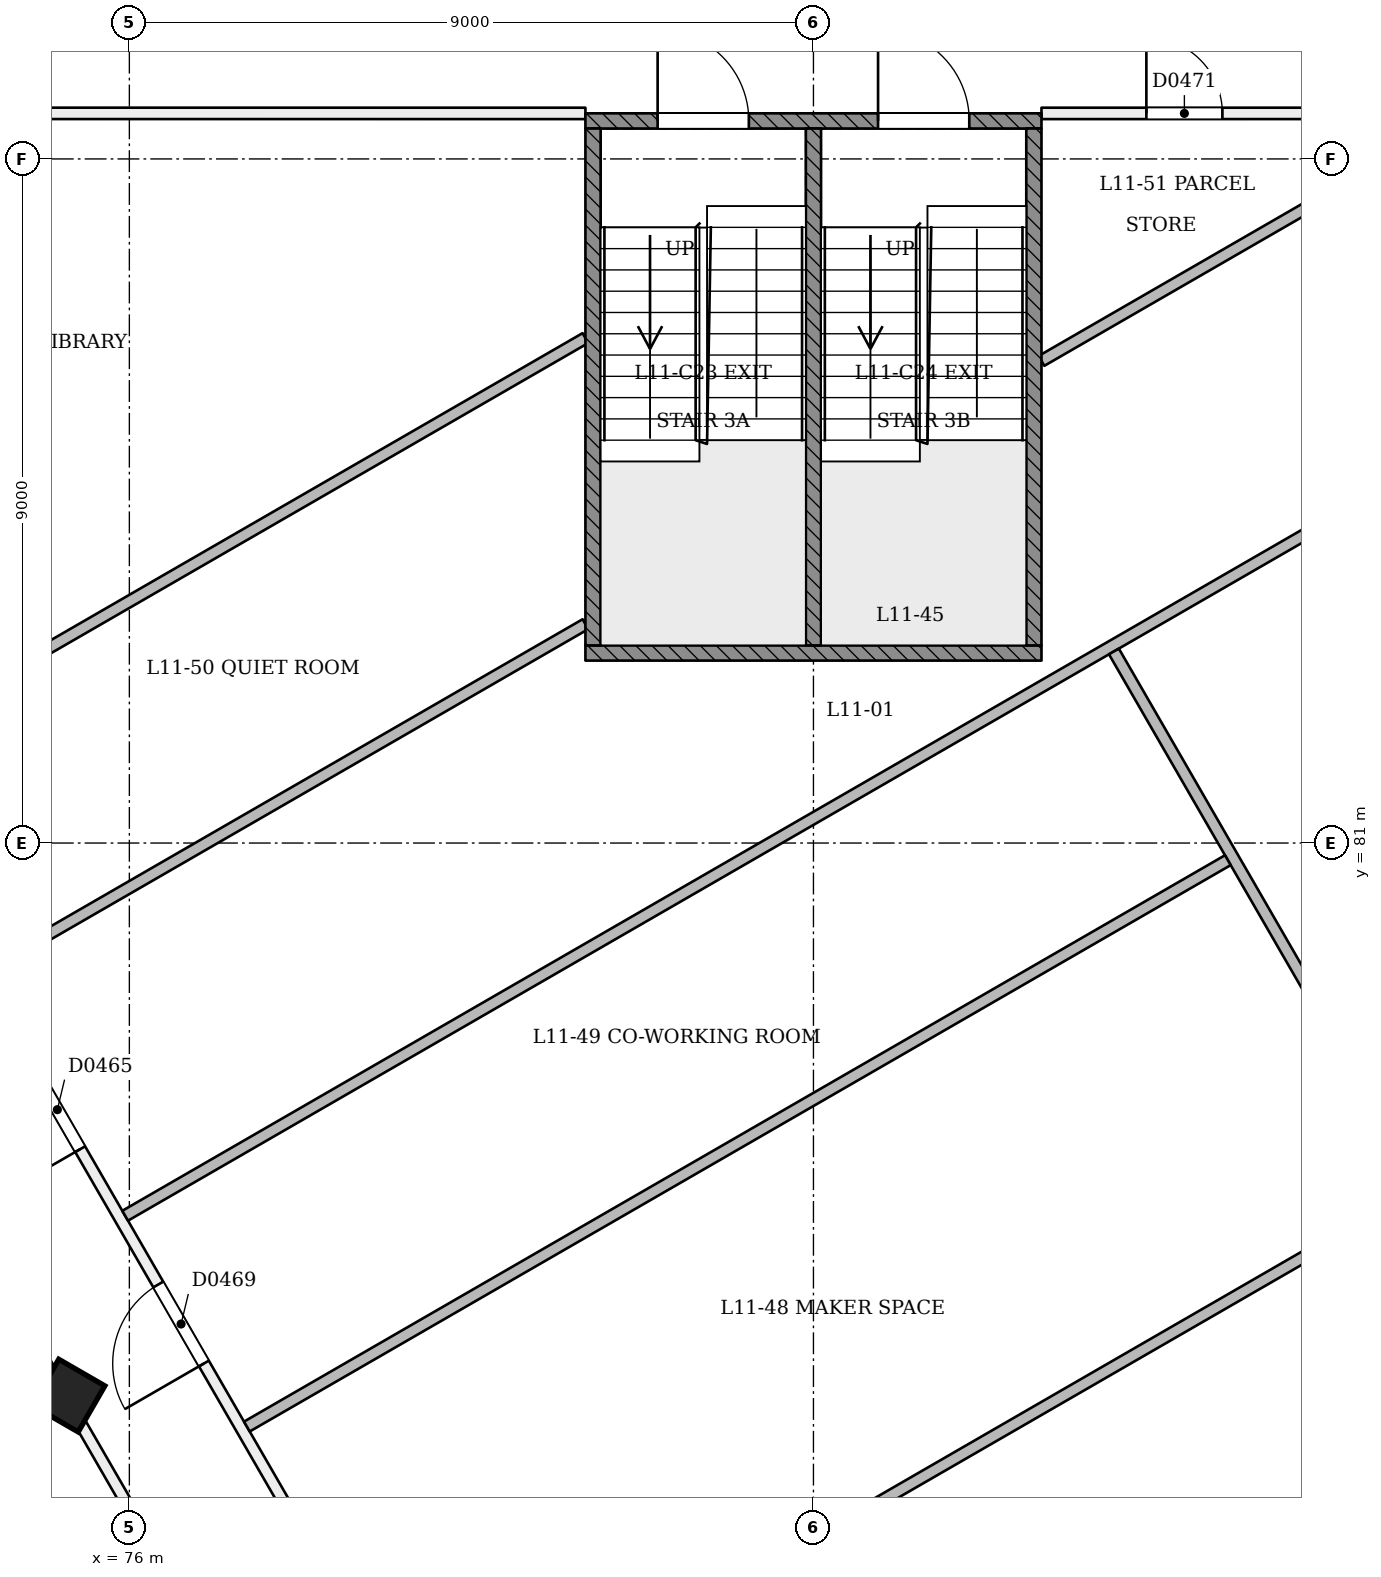
"""IFC4 building model, lengths in metres.
Left out: names, types, materials, properties, quantities, classifications, styles, units other than length and angle.
Written with IfcOpenShell. Run it as: python <this file> out.ifc"""

import sys

from ifc_helpers import new_model, si_unit, direction, frame, frame_2d, origin, origin_2d, place, context, subcontext, project, spatial, rectangle, extrude, element, fill, save


model = new_model("IFC4")
c1 = context("Model", 3, precision=1e-05, world=origin(), true_north=direction((0.0, 1.0)))
c2 = subcontext(c1, "Body", "Model", "MODEL_VIEW")
j1 = project(units=[si_unit("LENGTHUNIT", "METRE"), si_unit("PLANEANGLEUNIT", "RADIAN")], contexts=[c1])
p1 = place(None, origin())
s1 = spatial("IfcSite", under=j1, at=p1, CompositionType="ELEMENT")
p2 = place(p1, origin())
s2 = spatial("IfcBuilding", under=s1, at=p2, CompositionType="ELEMENT")
p3 = place(p2, frame((0.0, 0.0, 48.6)))
s3 = spatial("IfcBuildingStorey", under=s2, at=p3, CompositionType="ELEMENT", Elevation=48.6)
p4 = place(p3, frame((75.172, 73.683, -0.021), z_axis=(0.022222910879, 0.038415824599, 0.999014697916), x_axis=(-0.86602287418, -0.498524982078, 0.03843466718)))
e1 = element("IfcColumn", 1, at=p4, inside=s3, PredefinedType="COLUMN", context=c2, shape_type="SweptSolid", body=[
    extrude(rectangle(XDim=0.7, YDim=0.7, at=origin_2d()), origin(), (0.0, 0.0, 1.0), 3.604),
])
p5 = place(p3, frame((63.923, 93.17, 0.0), z_axis=(0.0, 0.0, 1.0), x_axis=(0.500002225217, -0.866024119051, 0.0)))
e2 = element("IfcWall", 2, at=p5, inside=s3, PredefinedType="PARTITIONING", context=c2, shape_type="SweptSolid", body=[
    extrude(rectangle(XDim=38.6, YDim=0.15, at=frame_2d((19.3, 0.0))), origin(), (0.0, 0.0, 1.0), 2.7),
])
p6 = place(p5, frame((0.605, 0.0, 0.0)))
e3 = element("IfcOpeningElement", 3, at=p6, cuts=e2, PredefinedType="OPENING", context=c2, shape_type="SweptSolid", body=[
    extrude(rectangle(XDim=1.0, YDim=2.1, at=frame_2d((0.5, 1.05))), frame((0.0, 0.085, 0.0), z_axis=(0.0, -1.0, 0.0), x_axis=(1.0, 0.0, 0.0)), (0.0, 0.0, 1.0), 0.171),
])
p7 = place(p5, frame((7.28, 0.0, 0.0)))
e4 = element("IfcOpeningElement", 4, at=p7, cuts=e2, PredefinedType="OPENING", context=c2, shape_type="SweptSolid", body=[
    extrude(rectangle(XDim=1.0, YDim=2.1, at=frame_2d((0.5, 1.05))), frame((0.0, 0.085, 0.0), z_axis=(0.0, -1.0, 0.0), x_axis=(1.0, 0.0, 0.0)), (0.0, 0.0, 1.0), 0.171),
])
p8 = place(p5, frame((9.72, 0.0, 0.0)))
e5 = element("IfcOpeningElement", 5, at=p8, cuts=e2, PredefinedType="OPENING", context=c2, shape_type="SweptSolid", body=[
    extrude(rectangle(XDim=1.0, YDim=2.1, at=frame_2d((0.5, 1.05))), frame((0.0, 0.085, 0.0), z_axis=(0.0, -1.0, 0.0), x_axis=(1.0, 0.0, 0.0)), (0.0, 0.0, 1.0), 0.171),
])
p9 = place(p5, frame((16.395, 0.0, 0.0)))
e6 = element("IfcOpeningElement", 6, at=p9, cuts=e2, PredefinedType="OPENING", context=c2, shape_type="SweptSolid", body=[
    extrude(rectangle(XDim=1.0, YDim=2.1, at=frame_2d((0.5, 1.05))), frame((0.0, 0.085, 0.0), z_axis=(0.0, -1.0, 0.0), x_axis=(1.0, 0.0, 0.0)), (0.0, 0.0, 1.0), 0.171),
])
p10 = place(p5, frame((18.72, 0.0, 0.0)))
e7 = element("IfcOpeningElement", 7, at=p10, cuts=e2, PredefinedType="OPENING", context=c2, shape_type="SweptSolid", body=[
    extrude(rectangle(XDim=1.0, YDim=2.1, at=frame_2d((0.5, 1.05))), frame((0.0, 0.085, 0.0), z_axis=(0.0, -1.0, 0.0), x_axis=(1.0, 0.0, 0.0)), (0.0, 0.0, 1.0), 0.171),
])
p11 = place(p5, frame((25.395, 0.0, 0.0)))
e8 = element("IfcOpeningElement", 8, at=p11, cuts=e2, PredefinedType="OPENING", context=c2, shape_type="SweptSolid", body=[
    extrude(rectangle(XDim=1.0, YDim=2.1, at=frame_2d((0.5, 1.05))), frame((0.0, 0.085, 0.0), z_axis=(0.0, -1.0, 0.0), x_axis=(1.0, 0.0, 0.0)), (0.0, 0.0, 1.0), 0.171),
])
p12 = place(p5, frame((27.605, 0.0, 0.0)))
e9 = element("IfcOpeningElement", 9, at=p12, cuts=e2, PredefinedType="OPENING", context=c2, shape_type="SweptSolid", body=[
    extrude(rectangle(XDim=1.0, YDim=2.1, at=frame_2d((0.5, 1.05))), frame((0.0, 0.085, 0.0), z_axis=(0.0, -1.0, 0.0), x_axis=(1.0, 0.0, 0.0)), (0.0, 0.0, 1.0), 0.171),
])
p13 = place(p5, frame((34.28, 0.0, 0.0)))
e10 = element("IfcOpeningElement", 10, at=p13, cuts=e2, PredefinedType="OPENING", context=c2, shape_type="SweptSolid", body=[
    extrude(rectangle(XDim=1.0, YDim=2.1, at=frame_2d((0.5, 1.05))), frame((0.0, 0.085, 0.0), z_axis=(0.0, -1.0, 0.0), x_axis=(1.0, 0.0, 0.0)), (0.0, 0.0, 1.0), 0.171),
])
p14 = place(p5, frame((37.342, 0.0, 0.0)))
e11 = element("IfcOpeningElement", 11, at=p14, cuts=e2, PredefinedType="OPENING", context=c2, shape_type="SweptSolid", body=[
    extrude(rectangle(XDim=1.0, YDim=2.1, at=frame_2d((0.5, 1.05))), frame((0.0, 0.085, 0.0), z_axis=(0.0, -1.0, 0.0), x_axis=(1.0, 0.0, 0.0)), (0.0, 0.0, 1.0), 0.171),
])
p15 = place(p3, frame((86.109, 58.583, 0.0), z_axis=(0.0, 0.0, 1.0), x_axis=(0.499999734377, 0.866025557142, 0.0)))
e12 = element("IfcWall", 12, at=p15, inside=s3, PredefinedType="PARTITIONING", context=c2, shape_type="SweptSolid", body=[
    extrude(rectangle(XDim=39.938, YDim=0.15, at=frame_2d((19.969, 0.0))), origin(), (0.0, 0.0, 1.0), 2.7),
])
p16 = place(p15, frame((3.619, 0.0, 0.0)))
e13 = element("IfcOpeningElement", 13, at=p16, cuts=e12, PredefinedType="OPENING", context=c2, shape_type="SweptSolid", body=[
    extrude(rectangle(XDim=1.2, YDim=2.1, at=frame_2d((0.6, 1.05))), frame((0.0, 0.085, 0.0), z_axis=(0.0, -1.0, 0.0), x_axis=(1.0, 0.0, 0.0)), (0.0, 0.0, 1.0), 0.171),
])
p17 = place(p15, frame((11.217, 0.0, 0.0)))
e14 = element("IfcOpeningElement", 14, at=p17, cuts=e12, PredefinedType="OPENING", context=c2, shape_type="SweptSolid", body=[
    extrude(rectangle(XDim=1.0, YDim=2.1, at=frame_2d((0.5, 1.05))), frame((0.0, 0.085, 0.0), z_axis=(0.0, -1.0, 0.0), x_axis=(1.0, 0.0, 0.0)), (0.0, 0.0, 1.0), 0.171),
])
p18 = place(p15, frame((13.658, 0.0, 0.0)))
e15 = element("IfcOpeningElement", 15, at=p18, cuts=e12, PredefinedType="OPENING", context=c2, shape_type="SweptSolid", body=[
    extrude(rectangle(XDim=1.0, YDim=2.1, at=frame_2d((0.5, 1.05))), frame((0.0, 0.085, 0.0), z_axis=(0.0, -1.0, 0.0), x_axis=(1.0, 0.0, 0.0)), (0.0, 0.0, 1.0), 0.171),
])
p19 = place(p15, frame((20.217, 0.0, 0.0)))
e16 = element("IfcOpeningElement", 16, at=p19, cuts=e12, PredefinedType="OPENING", context=c2, shape_type="SweptSolid", body=[
    extrude(rectangle(XDim=1.0, YDim=2.1, at=frame_2d((0.5, 1.05))), frame((0.0, 0.085, 0.0), z_axis=(0.0, -1.0, 0.0), x_axis=(1.0, 0.0, 0.0)), (0.0, 0.0, 1.0), 0.171),
])
p20 = place(p15, frame((22.658, 0.0, 0.0)))
e17 = element("IfcOpeningElement", 17, at=p20, cuts=e12, PredefinedType="OPENING", context=c2, shape_type="SweptSolid", body=[
    extrude(rectangle(XDim=1.0, YDim=2.1, at=frame_2d((0.5, 1.05))), frame((0.0, 0.085, 0.0), z_axis=(0.0, -1.0, 0.0), x_axis=(1.0, 0.0, 0.0)), (0.0, 0.0, 1.0), 0.171),
])
p21 = place(p15, frame((29.217, 0.0, 0.0)))
e18 = element("IfcOpeningElement", 18, at=p21, cuts=e12, PredefinedType="OPENING", context=c2, shape_type="SweptSolid", body=[
    extrude(rectangle(XDim=1.0, YDim=2.1, at=frame_2d((0.5, 1.05))), frame((0.0, 0.085, 0.0), z_axis=(0.0, -1.0, 0.0), x_axis=(1.0, 0.0, 0.0)), (0.0, 0.0, 1.0), 0.171),
])
p22 = place(p15, frame((31.658, 0.0, 0.0)))
e19 = element("IfcOpeningElement", 19, at=p22, cuts=e12, PredefinedType="OPENING", context=c2, shape_type="SweptSolid", body=[
    extrude(rectangle(XDim=1.0, YDim=2.1, at=frame_2d((0.5, 1.05))), frame((0.0, 0.085, 0.0), z_axis=(0.0, -1.0, 0.0), x_axis=(1.0, 0.0, 0.0)), (0.0, 0.0, 1.0), 0.171),
])
p23 = place(p15, frame((38.217, 0.0, 0.0)))
e20 = element("IfcOpeningElement", 20, at=p23, cuts=e12, PredefinedType="OPENING", context=c2, shape_type="SweptSolid", body=[
    extrude(rectangle(XDim=1.0, YDim=2.1, at=frame_2d((0.5, 1.05))), frame((0.0, 0.085, 0.0), z_axis=(0.0, -1.0, 0.0), x_axis=(1.0, 0.0, 0.0)), (0.0, 0.0, 1.0), 0.171),
])
p24 = place(p3, frame((85.0, 60.262, 0.0), z_axis=(0.0, 0.0, 1.0), x_axis=(-0.499998554739, 0.866026238205, 0.0)))
e21 = element("IfcWall", 21, at=p24, inside=s3, PredefinedType="PARTITIONING", context=c2, shape_type="SweptSolid", body=[
    extrude(rectangle(XDim=35.031, YDim=0.15, at=frame_2d((17.515, 0.0))), origin(), (0.0, 0.0, 1.0), 3.1),
])
p25 = place(p24, frame((6.026, 0.0, 0.0)))
e22 = element("IfcOpeningElement", 22, at=p25, cuts=e21, PredefinedType="OPENING", context=c2, shape_type="SweptSolid", body=[
    extrude(rectangle(XDim=1.2, YDim=2.1, at=frame_2d((0.6, 1.05))), frame((0.0, 0.085, 0.0), z_axis=(0.0, -1.0, 0.0), x_axis=(1.0, 0.0, 0.0)), (0.0, 0.0, 1.0), 0.171),
])
p26 = place(p24, frame((19.295, 0.0, 0.0)))
e23 = element("IfcOpeningElement", 23, at=p26, cuts=e21, PredefinedType="OPENING", context=c2, shape_type="SweptSolid", body=[
    extrude(rectangle(XDim=1.2, YDim=2.1, at=frame_2d((0.6, 1.05))), frame((0.0, 0.085, 0.0), z_axis=(0.0, -1.0, 0.0), x_axis=(1.0, 0.0, 0.0)), (0.0, 0.0, 1.0), 0.171),
])
p27 = place(p24, frame((28.126, 0.0, 0.0)))
e24 = element("IfcOpeningElement", 24, at=p27, cuts=e21, PredefinedType="OPENING", context=c2, shape_type="SweptSolid", body=[
    extrude(rectangle(XDim=1.2, YDim=2.1, at=frame_2d((0.6, 1.05))), frame((0.0, 0.085, 0.0), z_axis=(0.0, -1.0, 0.0), x_axis=(1.0, 0.0, 0.0)), (0.0, 0.0, 1.0), 0.171),
])
p28 = place(p24, frame((11.927, 0.0, 0.0)))
e25 = element("IfcOpeningElement", 25, at=p28, cuts=e21, PredefinedType="OPENING", context=c2, shape_type="SweptSolid", body=[
    extrude(rectangle(XDim=1.2, YDim=2.1, at=frame_2d((0.6, 1.05))), frame((0.0, 0.085, 0.0), z_axis=(0.0, -1.0, 0.0), x_axis=(1.0, 0.0, 0.0)), (0.0, 0.0, 1.0), 0.171),
])
p29 = place(p24, frame((16.039, 0.0, 0.0)))
e26 = element("IfcOpeningElement", 26, at=p29, cuts=e21, PredefinedType="OPENING", context=c2, shape_type="SweptSolid", body=[
    extrude(rectangle(XDim=1.2, YDim=2.1, at=frame_2d((0.6, 1.05))), frame((0.0, 0.085, 0.0), z_axis=(0.0, -1.0, 0.0), x_axis=(1.0, 0.0, 0.0)), (0.0, 0.0, 1.0), 0.171),
])
p30 = place(p24, frame((23.133, 0.0, 0.0)))
e27 = element("IfcOpeningElement", 27, at=p30, cuts=e21, PredefinedType="OPENING", context=c2, shape_type="SweptSolid", body=[
    extrude(rectangle(XDim=1.0, YDim=2.1, at=frame_2d((0.5, 1.05))), frame((0.0, 0.085, 0.0), z_axis=(0.0, -1.0, 0.0), x_axis=(1.0, 0.0, 0.0)), (0.0, 0.0, 1.0), 0.171),
])
p31 = place(p3, frame((88.0, 90.599, 0.0), z_axis=(0.0, 0.0, 1.0), x_axis=(0.999999997696, 6.7885206e-05, 0.0)))
e28 = element("IfcWall", 28, at=p31, inside=s3, PredefinedType="PARTITIONING", context=c2, shape_type="SweptSolid", body=[
    extrude(rectangle(XDim=14.385, YDim=0.15, at=frame_2d((7.193, 0.0))), origin(), (0.0, 0.0, 1.0), 3.1),
])
p32 = place(p31, frame((1.38, 0.0, 0.0)))
e29 = element("IfcOpeningElement", 29, at=p32, cuts=e28, PredefinedType="OPENING", context=c2, shape_type="SweptSolid", body=[
    extrude(rectangle(XDim=1.0, YDim=2.1, at=frame_2d((0.5, 1.05))), frame((0.0, 0.085, 0.0), z_axis=(0.0, -1.0, 0.0), x_axis=(1.0, 0.0, 0.0)), (0.0, 0.0, 1.0), 0.171),
])
p33 = place(p3, frame((102.515, 90.6, 0.0), z_axis=(0.0, 0.0, 1.0), x_axis=(-0.499999380783, -0.866025761289, 0.0)))
e30 = element("IfcWall", 30, at=p33, inside=s3, PredefinedType="PARTITIONING", context=c2, shape_type="SweptSolid", body=[
    extrude(rectangle(XDim=34.901, YDim=0.15, at=frame_2d((17.45, 0.0))), origin(), (0.0, 0.0, 1.0), 3.1),
])
p34 = place(p33, frame((9.207, 0.0, 0.0)))
e31 = element("IfcOpeningElement", 31, at=p34, cuts=e30, PredefinedType="OPENING", context=c2, shape_type="SweptSolid", body=[
    extrude(rectangle(XDim=1.2, YDim=2.1, at=frame_2d((0.6, 1.05))), frame((0.0, 0.085, 0.0), z_axis=(0.0, -1.0, 0.0), x_axis=(1.0, 0.0, 0.0)), (0.0, 0.0, 1.0), 0.171),
])
p35 = place(p3, frame((67.615, 90.6, 0.0), z_axis=(0.0, 0.0, 1.0), x_axis=(0.999999997696, -6.7885206e-05, 0.0)))
e32 = element("IfcWall", 32, at=p35, inside=s3, PredefinedType="PARTITIONING", context=c2, shape_type="SweptSolid", body=[
    extrude(rectangle(XDim=14.385, YDim=0.15, at=frame_2d((7.193, 0.0))), origin(), (0.0, 0.0, 1.0), 3.1),
])
p36 = place(p3, frame((72.644, 72.224, 0.0), z_axis=(0.0, 0.0, 1.0), x_axis=(0.866011243319, 0.500024525844, 0.0)))
e33 = element("IfcWall", 33, at=p36, inside=s3, PredefinedType="PARTITIONING", context=c2, shape_type="SweptSolid", body=[
    extrude(rectangle(XDim=2.845, YDim=0.1, at=frame_2d((1.422, 0.0))), origin(), (0.0, 0.0, 1.0), 2.7),
])
p37 = place(p3, frame((93.027, 76.464, 0.0), z_axis=(0.0, 0.0, 1.0), x_axis=(-0.866028686662, -0.499994313846, 0.0)))
e34 = element("IfcWall", 34, at=p37, inside=s3, PredefinedType="PARTITIONING", context=c2, shape_type="SweptSolid", body=[
    extrude(rectangle(XDim=14.977, YDim=0.15, at=frame_2d((7.489, 0.0))), origin(), (0.0, 0.0, 1.0), 3.1),
])
p38 = place(p3, frame((75.945, 76.097, 0.0), z_axis=(0.0, 0.0, 1.0), x_axis=(0.866026931326, 0.499997354212, 0.0)))
e35 = element("IfcWall", 35, at=p38, inside=s3, PredefinedType="PARTITIONING", context=c2, shape_type="SweptSolid", body=[
    extrude(rectangle(XDim=28.726, YDim=0.15, at=frame_2d((14.363, 0.0))), origin(), (0.0, 0.0, 1.0), 3.1),
])
p39 = place(p3, frame((82.0, 83.879, 0.0), z_axis=(0.0, 0.0, 1.0), x_axis=(-0.866037386495, -0.499979244763, 0.0)))
e36 = element("IfcWall", 36, at=p39, inside=s3, PredefinedType="PARTITIONING", context=c2, shape_type="SweptSolid", body=[
    extrude(rectangle(XDim=9.135, YDim=0.15, at=frame_2d((4.568, 0.0))), origin(), (0.0, 0.0, 1.0), 3.1),
])
p40 = place(p3, frame((93.398, 90.459, 0.0), z_axis=(0.0, 0.0, 1.0), x_axis=(-0.866019248489, -0.500010661132, 0.0)))
e37 = element("IfcWall", 37, at=p40, inside=s3, PredefinedType="PARTITIONING", context=c2, shape_type="SweptSolid", body=[
    extrude(rectangle(XDim=6.233, YDim=0.15, at=frame_2d((3.116, 0.0))), origin(), (0.0, 0.0, 1.0), 3.1),
])
p41 = place(p3, frame((88.953, 83.521, 0.0), z_axis=(0.0, 0.0, 1.0), x_axis=(0.499983344799, -0.866035019456, 0.0)))
e38 = element("IfcWall", 38, at=p41, inside=s3, PredefinedType="PARTITIONING", context=c2, shape_type="SweptSolid", body=[
    extrude(rectangle(XDim=8.073, YDim=0.15, at=frame_2d((4.037, 0.0))), origin(), (0.0, 0.0, 1.0), 3.1),
])
p42 = place(p3, frame((72.459, 82.135, 0.0), z_axis=(0.0, 0.0, 1.0), x_axis=(0.866029490193, 0.499992922065, 0.0)))
e39 = element("IfcWall", 39, at=p42, inside=s3, PredefinedType="PARTITIONING", context=c2, shape_type="SweptSolid", body=[
    extrude(rectangle(XDim=11.017, YDim=0.15, at=frame_2d((5.509, 0.0))), origin(), (0.0, 0.0, 1.0), 3.1),
])
p43 = place(p3, frame((90.452, 80.774, 0.0), z_axis=(0.0, 0.0, 1.0), x_axis=(-0.866020527158, -0.50000844647, 0.0)))
e40 = element("IfcWall", 40, at=p43, inside=s3, PredefinedType="PARTITIONING", context=c2, shape_type="SweptSolid", body=[
    extrude(rectangle(XDim=14.902, YDim=0.15, at=frame_2d((7.451, 0.0))), origin(), (0.0, 0.0, 1.0), 3.1),
])
p44 = place(p3, frame((82.0, 90.5, 0.0), z_axis=(0.0, 0.0, 1.0), x_axis=(1.0, 0.0, 0.0)))
e41 = element("IfcWall", 41, at=p44, inside=s3, PredefinedType="SOLIDWALL", context=c2, shape_type="SweptSolid", body=[
    extrude(rectangle(XDim=6.0, YDim=0.2, at=frame_2d((3.0, 0.0))), origin(), (0.0, 0.0, 1.0), 3.1),
])
p45 = place(p44, frame((0.95, 0.0, 0.0)))
e42 = element("IfcOpeningElement", 42, at=p45, cuts=e41, PredefinedType="OPENING", context=c2, shape_type="SweptSolid", body=[
    extrude(rectangle(XDim=1.2, YDim=2.1, at=frame_2d((0.6, 1.05))), frame((0.0, 0.11, 0.0), z_axis=(0.0, -1.0, 0.0), x_axis=(1.0, 0.0, 0.0)), (0.0, 0.0, 1.0), 0.221),
])
p46 = place(p44, frame((3.85, 0.0, 0.0)))
e43 = element("IfcOpeningElement", 43, at=p46, cuts=e41, PredefinedType="OPENING", context=c2, shape_type="SweptSolid", body=[
    extrude(rectangle(XDim=1.2, YDim=2.1, at=frame_2d((0.6, 1.05))), frame((0.0, 0.11, 0.0), z_axis=(0.0, -1.0, 0.0), x_axis=(1.0, 0.0, 0.0)), (0.0, 0.0, 1.0), 0.221),
])
p47 = place(p3, frame((82.0, 83.5, 0.0), z_axis=(0.0, 0.0, 1.0), x_axis=(1.0, 0.0, 0.0)))
e44 = element("IfcWall", 44, at=p47, inside=s3, PredefinedType="SOLIDWALL", context=c2, shape_type="SweptSolid", body=[
    extrude(rectangle(XDim=6.0, YDim=0.2, at=frame_2d((3.0, 0.0))), origin(), (0.0, 0.0, 1.0), 3.1),
])
for number, where, z_axis, x_axis in (
    (45, (82.1, 83.6, 0.0), (0.0, 0.0, 1.0), (0.0, 1.0, 0.0)),
    (46, (87.9, 83.6, 0.0), (0.0, 0.0, 1.0), (0.0, 1.0, 0.0)),
    (47, (85.0, 83.6, 0.0), (0.0, 0.0, 1.0), (0.0, 1.0, 0.0)),
):
    element("IfcWall", number, at=place(p3, frame(where, z_axis=z_axis, x_axis=x_axis)), inside=s3, PredefinedType="SOLIDWALL", context=c2, shape_type="SweptSolid", body=[
        extrude(rectangle(XDim=6.8, YDim=0.2, at=frame_2d((3.4, 0.0))), origin(), (0.0, 0.0, 1.0), 3.1),
    ])
p48 = place(p26, origin())
e48 = element("IfcDoor", 48, at=p48, inside=s3, OperationType="SINGLE_SWING_LEFT", PredefinedType="NOTDEFINED", context=c2, shape_type="SweptSolid", body=[
    extrude(rectangle(XDim=1.2, YDim=2.1, at=frame_2d((0.6, 1.05))), frame((0.0, 0.025, 0.0), z_axis=(0.0, -1.0, 0.0), x_axis=(1.0, 0.0, 0.0)), (0.0, 0.0, 1.0), 0.05),
])
fill(e23, e48)
p49 = place(p29, origin())
e49 = element("IfcDoor", 49, at=p49, inside=s3, OperationType="SINGLE_SWING_LEFT", PredefinedType="NOTDEFINED", context=c2, shape_type="SweptSolid", body=[
    extrude(rectangle(XDim=1.2, YDim=2.1, at=frame_2d((0.6, 1.05))), frame((0.0, 0.025, 0.0), z_axis=(0.0, -1.0, 0.0), x_axis=(1.0, 0.0, 0.0)), (0.0, 0.0, 1.0), 0.05),
])
fill(e26, e49)
p50 = place(p32, origin())
e50 = element("IfcDoor", 50, at=p50, inside=s3, OperationType="SINGLE_SWING_LEFT", PredefinedType="NOTDEFINED", context=c2, shape_type="SweptSolid", body=[
    extrude(rectangle(XDim=1.0, YDim=2.1, at=frame_2d((0.5, 1.05))), frame((0.0, 0.025, 0.0), z_axis=(0.0, -1.0, 0.0), x_axis=(1.0, 0.0, 0.0)), (0.0, 0.0, 1.0), 0.05),
])
fill(e29, e50)
p51 = place(p45, origin())
e51 = element("IfcDoor", 51, at=p51, inside=s3, OperationType="SINGLE_SWING_LEFT", PredefinedType="NOTDEFINED", context=c2, shape_type="SweptSolid", body=[
    extrude(rectangle(XDim=1.2, YDim=2.1, at=frame_2d((0.6, 1.05))), frame((0.0, 0.025, 0.0), z_axis=(0.0, -1.0, 0.0), x_axis=(1.0, 0.0, 0.0)), (0.0, 0.0, 1.0), 0.05),
])
fill(e42, e51)
p52 = place(p46, origin())
e52 = element("IfcDoor", 52, at=p52, inside=s3, OperationType="SINGLE_SWING_LEFT", PredefinedType="NOTDEFINED", context=c2, shape_type="SweptSolid", body=[
    extrude(rectangle(XDim=1.2, YDim=2.1, at=frame_2d((0.6, 1.05))), frame((0.0, 0.025, 0.0), z_axis=(0.0, -1.0, 0.0), x_axis=(1.0, 0.0, 0.0)), (0.0, 0.0, 1.0), 0.05),
])
fill(e43, e52)
save(model, sys.argv[1])
